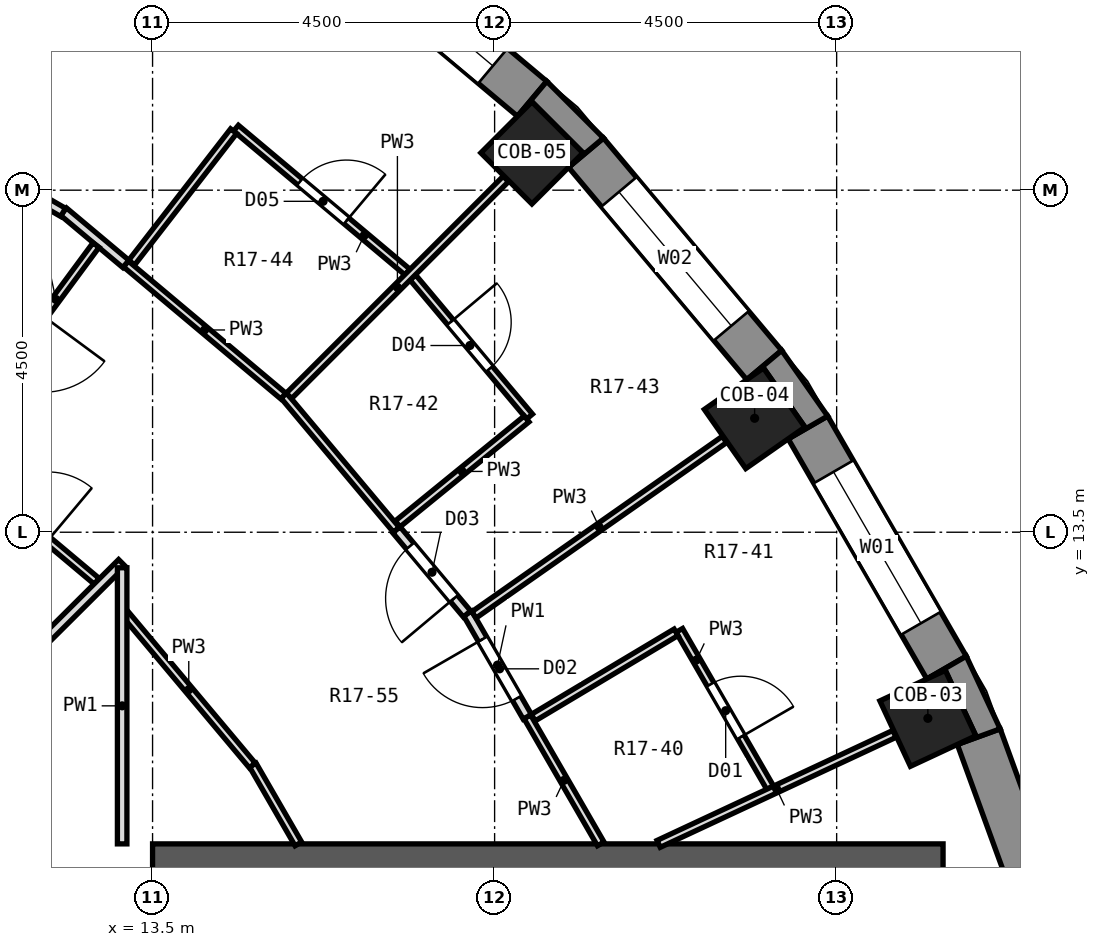
"""IFC4 building model, lengths in metres.
Left out: names, types, materials, properties, quantities, classifications, styles, units other than length and angle.
Written with IfcOpenShell. Run it as: python <this file> out.ifc"""

import sys

from ifc_helpers import new_model, si_unit, direction, frame, frame_2d, origin, origin_2d, place, context, subcontext, project, spatial, polyline, rectangle, outline, extrude, element, fill, save


model = new_model("IFC4")
c1 = context("Model", 3, precision=1e-05, world=origin(), true_north=direction((0.0, 1.0)))
c2 = subcontext(c1, "Body", "Model", "MODEL_VIEW")
j1 = project(units=[si_unit("LENGTHUNIT", "METRE"), si_unit("PLANEANGLEUNIT", "RADIAN")], contexts=[c1])
p1 = place(None, origin())
s1 = spatial("IfcSite", under=j1, at=p1, CompositionType="ELEMENT")
p2 = place(p1, origin())
s2 = spatial("IfcBuilding", under=s1, at=p2, CompositionType="ELEMENT")
p3 = place(p2, frame((0.0, 0.0, 91.9)))
s3 = spatial("IfcBuildingStorey", under=s2, at=p3, CompositionType="ELEMENT", Elevation=91.9)
for number, where, z_axis, x_axis in (
    (1, (23.7, 11.052, 0.0), (0.0, 0.0, 1.0), (0.906, 0.423, 0.0)),
    (2, (21.421, 14.999, 0.0), (0.0, 0.0, 1.0), (0.819, 0.574, 0.0)),
    (3, (18.491, 18.491, 0.0), (0.0, 0.0, 1.0), (0.707, 0.707, 0.0)),
):
    element("IfcColumn", number, at=place(p3, frame(where, z_axis=z_axis, x_axis=x_axis)), inside=s3, PredefinedType="COLUMN", context=c2, shape_type="SweptSolid", body=[
        extrude(rectangle(XDim=0.95, YDim=0.95, at=origin_2d()), origin(), (0.0, 0.0, 1.0), 3.3),
    ])
p4 = place(p3, frame((13.5, 9.0, 0.0), z_axis=(0.0, 0.0, 1.0), x_axis=(1.0, 0.0, 0.0)))
e4 = element("IfcWall", 4, at=p4, inside=s3, PredefinedType="SHEAR", context=c2, shape_type="SweptSolid", body=[
    extrude(rectangle(XDim=10.4, YDim=0.8, at=frame_2d((5.2, 0.0))), origin(), (0.0, 0.0, 1.0), 3.3),
])
p5 = place(p3, frame((25.617, 7.383, 0.0), z_axis=(0.0, 0.0, 1.0), x_axis=(-0.341990236633, 0.939703505393, 0.0)))
e5 = element("IfcWall", 5, at=p5, inside=s3, PredefinedType="SOLIDWALL", context=c2, shape_type="SweptSolid", body=[
    extrude(rectangle(XDim=3.648, YDim=0.6, at=frame_2d((1.824, 0.0))), origin(), (0.0, 0.0, 1.0), 2.8),
])
p6 = place(p3, frame((23.946, 11.719, 0.0), z_axis=(0.0, 0.0, 1.0), x_axis=(-0.499954196102, 0.866051847062, 0.0)))
e6 = element("IfcWall", 6, at=p6, inside=s3, PredefinedType="SOLIDWALL", context=c2, shape_type="SweptSolid", body=[
    extrude(rectangle(XDim=3.648, YDim=0.6, at=frame_2d((1.824, 0.0))), origin(), (0.0, 0.0, 1.0), 2.8),
])
p7 = place(p6, frame((0.674, 0.0, 0.9)))
e7 = element("IfcOpeningElement", 7, at=p7, cuts=e6, PredefinedType="OPENING", context=c2, shape_type="SweptSolid", body=[
    extrude(rectangle(XDim=2.3, YDim=1.8, at=frame_2d((1.15, 0.9))), frame((0.0, 0.312, 0.0), z_axis=(0.0, -1.0, 0.0), x_axis=(1.0, 0.0, 0.0)), (0.0, 0.0, 1.0), 0.624),
])
p8 = place(p3, frame((21.547, 15.699, 0.0), z_axis=(0.0, 0.0, 1.0), x_axis=(-0.642774476932, 0.766055462616, 0.0)))
e8 = element("IfcWall", 8, at=p8, inside=s3, PredefinedType="SOLIDWALL", context=c2, shape_type="SweptSolid", body=[
    extrude(rectangle(XDim=3.648, YDim=0.6, at=frame_2d((1.824, 0.0))), origin(), (0.0, 0.0, 1.0), 2.8),
])
p9 = place(p8, frame((0.674, 0.0, 0.9)))
e9 = element("IfcOpeningElement", 9, at=p9, cuts=e8, PredefinedType="OPENING", context=c2, shape_type="SweptSolid", body=[
    extrude(rectangle(XDim=2.3, YDim=1.8, at=frame_2d((1.15, 0.9))), frame((0.0, 0.312, 0.0), z_axis=(0.0, -1.0, 0.0), x_axis=(1.0, 0.0, 0.0)), (0.0, 0.0, 1.0), 0.624),
])
p10 = place(p3, frame((18.494, 19.202, 0.0), z_axis=(0.0, 0.0, 1.0), x_axis=(-0.766055462616, 0.642774476932, 0.0)))
e10 = element("IfcWall", 10, at=p10, inside=s3, PredefinedType="SOLIDWALL", context=c2, shape_type="SweptSolid", body=[
    extrude(rectangle(XDim=3.648, YDim=0.6, at=frame_2d((1.824, 0.0))), origin(), (0.0, 0.0, 1.0), 2.8),
])
p11 = place(p10, frame((0.674, 0.0, 0.9)))
e11 = element("IfcOpeningElement", 11, at=p11, cuts=e10, PredefinedType="OPENING", context=c2, shape_type="SweptSolid", body=[
    extrude(rectangle(XDim=2.3, YDim=1.8, at=frame_2d((1.15, 0.9))), frame((0.0, 0.312, 0.0), z_axis=(0.0, -1.0, 0.0), x_axis=(1.0, 0.0, 0.0)), (0.0, 0.0, 1.0), 0.624),
])
p12 = place(p3, origin())
e12 = element("IfcWall", 12, at=p12, inside=s3, PredefinedType="SOLIDWALL", context=c2, shape_type="SweptSolid", body=[
    extrude(outline(polyline([(24.651, 10.913), (24.206, 11.869), (23.686, 11.569), (23.93, 11.683), (24.331, 10.822), (24.087, 10.708), (24.651, 10.913)])), origin(), (0.0, 0.0, 1.0), 2.8),
])
p13 = place(p3, origin())
e13 = element("IfcWall", 13, at=p13, inside=s3, PredefinedType="SOLIDWALL", context=c2, shape_type="SweptSolid", body=[
    extrude(outline(polyline([(21.777, 15.892), (21.317, 15.506), (21.538, 15.661), (22.083, 14.882), (21.862, 14.728), (22.382, 15.028), (21.777, 15.892)])), origin(), (0.0, 0.0, 1.0), 2.8),
])
p14 = place(p3, origin())
e14 = element("IfcWall", 14, at=p14, inside=s3, PredefinedType="SOLIDWALL", context=c2, shape_type="SweptSolid", body=[
    extrude(outline(polyline([(19.432, 18.686), (18.686, 19.432), (18.301, 18.972), (18.491, 19.163), (19.163, 18.491), (18.972, 18.301), (19.432, 18.686)])), origin(), (0.0, 0.0, 1.0), 2.8),
])
p15 = place(p3, frame((14.819, 10.438, 0.0), z_axis=(0.0, 0.0, 1.0), x_axis=(0.500016292001, -0.866015997389, 0.0)))
e15 = element("IfcWall", 15, at=p15, inside=s3, PredefinedType="PARTITIONING", context=c2, shape_type="SweptSolid", body=[
    extrude(rectangle(XDim=1.199, YDim=0.1, at=frame_2d((0.599, 0.0))), origin(), (0.0, 0.0, 1.0), 2.8),
])
p16 = place(p3, frame((18.43, 11.072, 0.0), z_axis=(0.0, 0.0, 1.0), x_axis=(0.500203884267, -0.865907659144, 0.0)))
e16 = element("IfcWall", 16, at=p16, inside=s3, PredefinedType="PARTITIONING", context=c2, shape_type="SweptSolid", body=[
    extrude(rectangle(XDim=1.931, YDim=0.1, at=frame_2d((0.966, 0.0))), origin(), (0.0, 0.0, 1.0), 2.8),
])
p17 = place(p3, frame((17.645, 12.432, 0.0), z_axis=(0.0, 0.0, 1.0), x_axis=(0.499852597388, -0.866110489998, 0.0)))
e17 = element("IfcWall", 17, at=p17, inside=s3, PredefinedType="PARTITIONING", context=c2, shape_type="SweptSolid", body=[
    extrude(rectangle(XDim=1.57, YDim=0.125, at=frame_2d((0.785, 0.0))), origin(), (0.0, 0.0, 1.0), 2.8),
])
p18 = place(p17, frame((0.392, 0.0, 0.0)))
e18 = element("IfcOpeningElement", 18, at=p18, cuts=e17, PredefinedType="OPENING", context=c2, shape_type="SweptSolid", body=[
    extrude(rectangle(XDim=0.9, YDim=2.1, at=frame_2d((0.45, 1.05))), frame((0.0, 0.074, 0.0), z_axis=(0.0, -1.0, 0.0), x_axis=(1.0, 0.0, 0.0)), (0.0, 0.0, 1.0), 0.149),
])
p19 = place(p3, frame((20.43, 12.209, 0.0), z_axis=(0.0, 0.0, 1.0), x_axis=(0.500061428766, -0.865989934965, 0.0)))
e19 = element("IfcWall", 19, at=p19, inside=s3, PredefinedType="PARTITIONING", context=c2, shape_type="SweptSolid", body=[
    extrude(rectangle(XDim=2.39, YDim=0.1, at=frame_2d((1.195, 0.0))), origin(), (0.0, 0.0, 1.0), 2.8),
])
p20 = place(p19, frame((0.82, 0.0, 0.0)))
e20 = element("IfcOpeningElement", 20, at=p20, cuts=e19, PredefinedType="OPENING", context=c2, shape_type="SweptSolid", body=[
    extrude(rectangle(XDim=0.8, YDim=2.1, at=frame_2d((0.4, 1.05))), frame((0.0, 0.062, 0.0), z_axis=(0.0, -1.0, 0.0), x_axis=(1.0, 0.0, 0.0)), (0.0, 0.0, 1.0), 0.124),
])
p21 = place(p3, frame((13.14, 12.425, 0.0), z_axis=(0.0, 0.0, 1.0), x_axis=(0.642692247105, -0.766124451712, 0.0)))
e21 = element("IfcWall", 21, at=p21, inside=s3, PredefinedType="PARTITIONING", context=c2, shape_type="SweptSolid", body=[
    extrude(rectangle(XDim=2.601, YDim=0.1, at=frame_2d((1.301, 0.0))), origin(), (0.0, 0.0, 1.0), 2.8),
])
p22 = place(p3, frame((15.226, 15.299, 0.0), z_axis=(0.0, 0.0, 1.0), x_axis=(0.642762571273, -0.766065452145, 0.0)))
e22 = element("IfcWall", 22, at=p22, inside=s3, PredefinedType="PARTITIONING", context=c2, shape_type="SweptSolid", body=[
    extrude(rectangle(XDim=2.307, YDim=0.1, at=frame_2d((1.153, 0.0))), origin(), (0.0, 0.0, 1.0), 2.8),
])
p23 = place(p3, frame((16.708, 13.532, 0.0), z_axis=(0.0, 0.0, 1.0), x_axis=(0.642641061866, -0.766167387458, 0.0)))
e23 = element("IfcWall", 23, at=p23, inside=s3, PredefinedType="PARTITIONING", context=c2, shape_type="SweptSolid", body=[
    extrude(rectangle(XDim=1.445, YDim=0.125, at=frame_2d((0.722, 0.0))), origin(), (0.0, 0.0, 1.0), 2.8),
])
p24 = place(p23, frame((0.279, 0.0, 0.0)))
e24 = element("IfcOpeningElement", 24, at=p24, cuts=e23, PredefinedType="OPENING", context=c2, shape_type="SweptSolid", body=[
    extrude(rectangle(XDim=0.9, YDim=2.1, at=frame_2d((0.45, 1.05))), frame((0.0, 0.074, 0.0), z_axis=(0.0, -1.0, 0.0), x_axis=(1.0, 0.0, 0.0)), (0.0, 0.0, 1.0), 0.149),
])
p25 = place(p3, frame((16.923, 16.853, 0.0), z_axis=(0.0, 0.0, 1.0), x_axis=(0.642942941421, -0.765914077477, 0.0)))
e25 = element("IfcWall", 25, at=p25, inside=s3, PredefinedType="PARTITIONING", context=c2, shape_type="SweptSolid", body=[
    extrude(rectangle(XDim=2.39, YDim=0.1, at=frame_2d((1.195, 0.0))), origin(), (0.0, 0.0, 1.0), 2.8),
])
p26 = place(p25, frame((0.77, 0.0, 0.0)))
e26 = element("IfcOpeningElement", 26, at=p26, cuts=e25, PredefinedType="OPENING", context=c2, shape_type="SweptSolid", body=[
    extrude(rectangle(XDim=0.8, YDim=2.1, at=frame_2d((0.4, 1.05))), frame((0.0, 0.062, 0.0), z_axis=(0.0, -1.0, 0.0), x_axis=(1.0, 0.0, 0.0)), (0.0, 0.0, 1.0), 0.124),
])
p27 = place(p3, frame((10.311, 14.914, 0.0), z_axis=(0.0, 0.0, 1.0), x_axis=(0.766187913062, -0.642616590104, 0.0)))
e27 = element("IfcWall", 27, at=p27, inside=s3, PredefinedType="PARTITIONING", context=c2, shape_type="SweptSolid", body=[
    extrude(rectangle(XDim=3.205, YDim=0.1, at=frame_2d((1.602, 0.0))), origin(), (0.0, 0.0, 1.0), 2.8),
])
p28 = place(p27, frame((1.466, 0.0, 0.0)))
e28 = element("IfcOpeningElement", 28, at=p28, cuts=e27, PredefinedType="OPENING", context=c2, shape_type="SweptSolid", body=[
    extrude(rectangle(XDim=0.9, YDim=2.1, at=frame_2d((0.45, 1.05))), frame((0.0, 0.062, 0.0), z_axis=(0.0, -1.0, 0.0), x_axis=(1.0, 0.0, 0.0)), (0.0, 0.0, 1.0), 0.124),
])
p29 = place(p3, frame((13.149, 17.03, 0.0), z_axis=(0.0, 0.0, 1.0), x_axis=(0.766003631775, -0.642836243617, 0.0)))
e29 = element("IfcWall", 29, at=p29, inside=s3, PredefinedType="PARTITIONING", context=c2, shape_type="SweptSolid", body=[
    extrude(rectangle(XDim=2.704, YDim=0.1, at=frame_2d((1.352, 0.0))), origin(), (0.0, 0.0, 1.0), 2.8),
])
p30 = place(p3, frame((12.328, 17.718, 0.0), z_axis=(0.0, 0.0, 1.0), x_axis=(0.766311067441, -0.642469725292, 0.0)))
e30 = element("IfcWall", 30, at=p30, inside=s3, PredefinedType="PARTITIONING", context=c2, shape_type="SweptSolid", body=[
    extrude(rectangle(XDim=1.071, YDim=0.125, at=frame_2d((0.535, 0.0))), origin(), (0.0, 0.0, 1.0), 2.8),
])
p31 = place(p3, frame((14.597, 18.816, 0.0), z_axis=(0.0, 0.0, 1.0), x_axis=(0.766055897741, -0.642773958353, 0.0)))
e31 = element("IfcWall", 31, at=p31, inside=s3, PredefinedType="PARTITIONING", context=c2, shape_type="SweptSolid", body=[
    extrude(rectangle(XDim=2.945, YDim=0.1, at=frame_2d((1.472, 0.0))), origin(), (0.0, 0.0, 1.0), 2.8),
])
p32 = place(p31, frame((1.097, 0.0, 0.0)))
e32 = element("IfcOpeningElement", 32, at=p32, cuts=e31, PredefinedType="OPENING", context=c2, shape_type="SweptSolid", body=[
    extrude(rectangle(XDim=0.8, YDim=2.1, at=frame_2d((0.4, 1.05))), frame((0.0, 0.062, 0.0), z_axis=(0.0, -1.0, 0.0), x_axis=(1.0, 0.0, 0.0)), (0.0, 0.0, 1.0), 0.124),
])
p33 = place(p3, frame((9.065, 19.59, 0.0), z_axis=(0.0, 0.0, 1.0), x_axis=(0.865961876044, -0.500110017135, 0.0)))
e33 = element("IfcWall", 33, at=p33, inside=s3, PredefinedType="PARTITIONING", context=c2, shape_type="SweptSolid", body=[
    extrude(rectangle(XDim=3.762, YDim=0.125, at=frame_2d((1.881, 0.0))), origin(), (0.0, 0.0, 1.0), 2.8),
])
p34 = place(p33, frame((1.494, 0.0, 0.0)))
e34 = element("IfcOpeningElement", 34, at=p34, cuts=e33, PredefinedType="OPENING", context=c2, shape_type="SweptSolid", body=[
    extrude(rectangle(XDim=0.9, YDim=2.1, at=frame_2d((0.45, 1.05))), frame((0.0, 0.074, 0.0), z_axis=(0.0, -1.0, 0.0), x_axis=(1.0, 0.0, 0.0)), (0.0, 0.0, 1.0), 0.149),
])
p35 = place(p3, frame((20.158, 9.4, 0.0), z_axis=(0.0, 0.0, 1.0), x_axis=(0.906223222272, 0.422799564114, 0.0)))
e35 = element("IfcWall", 35, at=p35, inside=s3, PredefinedType="PARTITIONING", context=c2, shape_type="SweptSolid", body=[
    extrude(rectangle(XDim=3.423, YDim=0.1, at=frame_2d((1.711, 0.0))), origin(), (0.0, 0.0, 1.0), 2.8),
])
p36 = place(p3, frame((18.509, 11.061, 0.0), z_axis=(0.0, 0.0, 1.0), x_axis=(0.85844638645, 0.512903306279, 0.0)))
e36 = element("IfcWall", 36, at=p36, inside=s3, PredefinedType="PARTITIONING", context=c2, shape_type="SweptSolid", body=[
    extrude(rectangle(XDim=2.188, YDim=0.1, at=frame_2d((1.094, 0.0))), origin(), (0.0, 0.0, 1.0), 2.8),
])
p37 = place(p3, frame((17.728, 12.413, 0.0), z_axis=(0.0, 0.0, 1.0), x_axis=(0.819106461113, 0.573641530368, 0.0)))
e37 = element("IfcWall", 37, at=p37, inside=s3, PredefinedType="PARTITIONING", context=c2, shape_type="SweptSolid", body=[
    extrude(rectangle(XDim=4.023, YDim=0.1, at=frame_2d((2.012, 0.0))), origin(), (0.0, 0.0, 1.0), 2.8),
])
p38 = place(p3, frame((16.724, 13.609, 0.0), z_axis=(0.0, 0.0, 1.0), x_axis=(0.77556073315, 0.631272959342, 0.0)))
e38 = element("IfcWall", 38, at=p38, inside=s3, PredefinedType="PARTITIONING", context=c2, shape_type="SweptSolid", body=[
    extrude(rectangle(XDim=2.188, YDim=0.1, at=frame_2d((1.094, 0.0))), origin(), (0.0, 0.0, 1.0), 2.8),
])
p39 = place(p3, frame((7.844, 7.861, 0.0), z_axis=(0.0, 0.0, 1.0), x_axis=(0.708356490253, 0.705854859526, 0.0)))
e39 = element("IfcWall", 39, at=p39, inside=s3, PredefinedType="PARTITIONING", context=c2, shape_type="SweptSolid", body=[
    extrude(rectangle(XDim=7.417, YDim=0.125, at=frame_2d((3.708, 0.0))), origin(), (0.0, 0.0, 1.0), 2.8),
])
p40 = place(p3, frame((15.294, 15.294, 0.0), z_axis=(0.0, 0.0, 1.0), x_axis=(0.707106781187, 0.707106781187, 0.0)))
e40 = element("IfcWall", 40, at=p40, inside=s3, PredefinedType="PARTITIONING", context=c2, shape_type="SweptSolid", body=[
    extrude(rectangle(XDim=4.035, YDim=0.1, at=frame_2d((2.018, 0.0))), origin(), (0.0, 0.0, 1.0), 2.8),
])
p41 = place(p3, frame((13.225, 17.047, 0.0), z_axis=(0.0, 0.0, 1.0), x_axis=(0.612827784587, 0.790216493398, 0.0)))
e41 = element("IfcWall", 41, at=p41, inside=s3, PredefinedType="PARTITIONING", context=c2, shape_type="SweptSolid", body=[
    extrude(rectangle(XDim=2.188, YDim=0.1, at=frame_2d((1.094, 0.0))), origin(), (0.0, 0.0, 1.0), 2.8),
])
p42 = place(p3, frame((10.773, 14.591, 0.0), z_axis=(0.0, 0.0, 1.0), x_axis=(0.593899624956, 0.804539144776, 0.0)))
e42 = element("IfcWall", 42, at=p42, inside=s3, PredefinedType="PARTITIONING", context=c2, shape_type="SweptSolid", body=[
    extrude(rectangle(XDim=3.339, YDim=0.1, at=frame_2d((1.669, 0.0))), origin(), (0.0, 0.0, 1.0), 2.8),
])
p43 = place(p42, frame((1.176, 0.0, 0.0)))
e43 = element("IfcOpeningElement", 43, at=p43, cuts=e42, PredefinedType="OPENING", context=c2, shape_type="SweptSolid", body=[
    extrude(rectangle(XDim=1.0, YDim=2.1, at=frame_2d((0.5, 1.05))), frame((0.0, 0.062, 0.0), z_axis=(0.0, -1.0, 0.0), x_axis=(1.0, 0.0, 0.0)), (0.0, 0.0, 1.0), 0.124),
])
p44 = place(p3, frame((13.1, 9.4, 0.0), z_axis=(0.0, 0.0, 1.0), x_axis=(0.0, 1.0, 0.0)))
e44 = element("IfcWall", 44, at=p44, inside=s3, PredefinedType="PARTITIONING", context=c2, shape_type="SweptSolid", body=[
    extrude(rectangle(XDim=3.633, YDim=0.125, at=frame_2d((1.816, 0.0))), origin(), (0.0, 0.0, 1.0), 2.8),
])
p45 = place(p7, origin())
e45 = element("IfcWindow", 45, at=p45, inside=s3, PartitioningType="SINGLE_PANEL", PredefinedType="WINDOW", context=c2, shape_type="SweptSolid", body=[
    extrude(rectangle(XDim=2.3, YDim=1.8, at=frame_2d((1.15, 0.9))), frame((0.0, 0.18, 0.0), z_axis=(0.0, -1.0, 0.0), x_axis=(1.0, 0.0, 0.0)), (0.0, 0.0, 1.0), 0.06),
])
fill(e7, e45)
p46 = place(p9, origin())
e46 = element("IfcWindow", 46, at=p46, inside=s3, PartitioningType="SINGLE_PANEL", PredefinedType="WINDOW", context=c2, shape_type="SweptSolid", body=[
    extrude(rectangle(XDim=2.3, YDim=1.8, at=frame_2d((1.15, 0.9))), frame((0.0, 0.18, 0.0), z_axis=(0.0, -1.0, 0.0), x_axis=(1.0, 0.0, 0.0)), (0.0, 0.0, 1.0), 0.06),
])
fill(e9, e46)
p47 = place(p11, origin())
e47 = element("IfcWindow", 47, at=p47, inside=s3, PartitioningType="SINGLE_PANEL", PredefinedType="WINDOW", context=c2, shape_type="SweptSolid", body=[
    extrude(rectangle(XDim=2.3, YDim=1.8, at=frame_2d((1.15, 0.9))), frame((0.0, 0.18, 0.0), z_axis=(0.0, -1.0, 0.0), x_axis=(1.0, 0.0, 0.0)), (0.0, 0.0, 1.0), 0.06),
])
fill(e11, e47)
p48 = place(p20, origin())
e48 = element("IfcDoor", 48, at=p48, inside=s3, OperationType="SINGLE_SWING_RIGHT", PredefinedType="DOOR", context=c2, shape_type="SweptSolid", body=[
    extrude(rectangle(XDim=0.8, YDim=2.1, at=frame_2d((0.4, 1.05))), frame((0.0, 0.025, 0.0), z_axis=(0.0, -1.0, 0.0), x_axis=(1.0, 0.0, 0.0)), (0.0, 0.0, 1.0), 0.05),
])
fill(e20, e48)
p49 = place(p18, frame((0.9, 0.0, 0.0), z_axis=(0.0, 0.0, 1.0), x_axis=(-1.0, 0.0, 0.0)))
e49 = element("IfcDoor", 49, at=p49, inside=s3, OperationType="SINGLE_SWING_RIGHT", PredefinedType="DOOR", context=c2, shape_type="SweptSolid", body=[
    extrude(rectangle(XDim=0.9, YDim=2.1, at=frame_2d((0.45, 1.05))), frame((0.0, 0.025, 0.0), z_axis=(0.0, -1.0, 0.0), x_axis=(1.0, 0.0, 0.0)), (0.0, 0.0, 1.0), 0.05),
])
fill(e18, e49)
p50 = place(p24, frame((0.9, 0.0, 0.0), z_axis=(0.0, 0.0, 1.0), x_axis=(-1.0, 0.0, 0.0)))
e50 = element("IfcDoor", 50, at=p50, inside=s3, OperationType="SINGLE_SWING_LEFT", PredefinedType="DOOR", context=c2, shape_type="SweptSolid", body=[
    extrude(rectangle(XDim=0.9, YDim=2.1, at=frame_2d((0.45, 1.05))), frame((0.0, 0.025, 0.0), z_axis=(0.0, -1.0, 0.0), x_axis=(1.0, 0.0, 0.0)), (0.0, 0.0, 1.0), 0.05),
])
fill(e24, e50)
p51 = place(p26, origin())
e51 = element("IfcDoor", 51, at=p51, inside=s3, OperationType="SINGLE_SWING_LEFT", PredefinedType="DOOR", context=c2, shape_type="SweptSolid", body=[
    extrude(rectangle(XDim=0.8, YDim=2.1, at=frame_2d((0.4, 1.05))), frame((0.0, 0.025, 0.0), z_axis=(0.0, -1.0, 0.0), x_axis=(1.0, 0.0, 0.0)), (0.0, 0.0, 1.0), 0.05),
])
fill(e26, e51)
p52 = place(p32, origin())
e52 = element("IfcDoor", 52, at=p52, inside=s3, OperationType="SINGLE_SWING_RIGHT", PredefinedType="DOOR", context=c2, shape_type="SweptSolid", body=[
    extrude(rectangle(XDim=0.8, YDim=2.1, at=frame_2d((0.4, 1.05))), frame((0.0, 0.025, 0.0), z_axis=(0.0, -1.0, 0.0), x_axis=(1.0, 0.0, 0.0)), (0.0, 0.0, 1.0), 0.05),
])
fill(e32, e52)
save(model, sys.argv[1])
